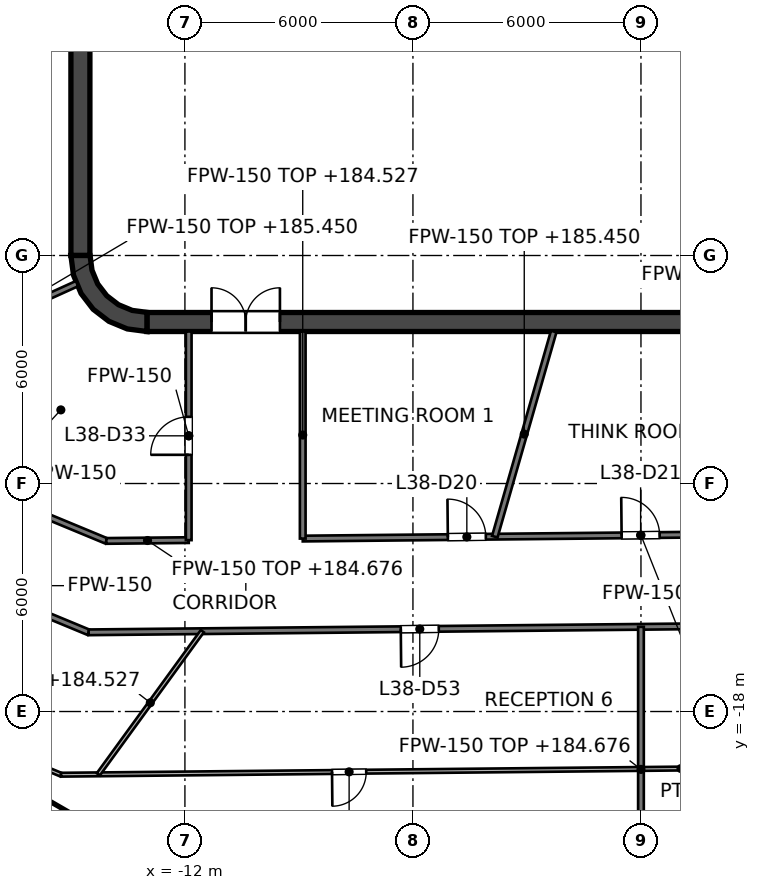
"""IFC4 building model, lengths in metres.
Left out: names, types, materials, properties, quantities, classifications, styles, units other than length and angle.
Written with IfcOpenShell. Run it as: python <this file> out.ifc"""

import sys

from ifc_helpers import new_model, si_unit, direction, frame, frame_2d, origin, place, context, subcontext, project, spatial, polyline, rectangle, outline, extrude, element, fill, save


model = new_model("IFC4")
c1 = context("Model", 3, precision=1e-05, world=origin(), true_north=direction((0.0, 1.0)))
c2 = subcontext(c1, "Body", "Model", "MODEL_VIEW")
j1 = project(units=[si_unit("LENGTHUNIT", "METRE"), si_unit("PLANEANGLEUNIT", "RADIAN")], contexts=[c1])
p1 = place(None, origin())
s1 = spatial("IfcSite", under=j1, at=p1, CompositionType="ELEMENT")
p2 = place(p1, origin())
s2 = spatial("IfcBuilding", under=s1, at=p2, CompositionType="ELEMENT")
p3 = place(p2, frame((0.0, 0.0, 181.6)))
s3 = spatial("IfcBuildingStorey", under=s2, at=p3, CompositionType="ELEMENT", Elevation=181.6)
p4 = place(p3, frame((-13.0, -7.75, 0.0), z_axis=(0.0, 0.0, 1.0), x_axis=(1.0, 0.0, 0.0)))
e1 = element("IfcWall", 1, at=p4, inside=s3, PredefinedType="SHEAR", context=c2, shape_type="SweptSolid", body=[
    extrude(rectangle(XDim=26.0, YDim=0.5, at=frame_2d((13.0, 0.0))), origin(), (0.0, 0.0, 1.0), 4.0),
])
p5 = place(p4, frame((1.7, 0.0, 0.0)))
e2 = element("IfcOpeningElement", 2, at=p5, cuts=e1, PredefinedType="OPENING", context=c2, shape_type="SweptSolid", body=[
    extrude(rectangle(XDim=1.8, YDim=2.1, at=frame_2d((0.9, 1.05))), frame((0.0, 0.25, 0.0), z_axis=(0.0, -1.0, 0.0), x_axis=(1.0, 0.0, 0.0)), (0.0, 0.0, 1.0), 0.5),
])
p6 = place(p4, frame((22.5, 0.0, 0.0)))
e3 = element("IfcOpeningElement", 3, at=p6, cuts=e1, PredefinedType="OPENING", context=c2, shape_type="SweptSolid", body=[
    extrude(rectangle(XDim=1.8, YDim=2.1, at=frame_2d((0.9, 1.05))), frame((0.0, 0.25, 0.0), z_axis=(0.0, -1.0, 0.0), x_axis=(1.0, 0.0, 0.0)), (0.0, 0.0, 1.0), 0.5),
])
p7 = place(p3, frame((-14.75, -6.0, 0.0), z_axis=(0.0, 0.0, 1.0), x_axis=(0.0, 1.0, 0.0)))
e4 = element("IfcWall", 4, at=p7, inside=s3, PredefinedType="SHEAR", context=c2, shape_type="SweptSolid", body=[
    extrude(rectangle(XDim=12.0, YDim=0.5, at=frame_2d((6.0, 0.0))), origin(), (0.0, 0.0, 1.0), 4.0),
])
p8 = place(p3, origin())
e5 = element("IfcWall", 5, at=p8, inside=s3, PredefinedType="SHEAR", context=c2, shape_type="SweptSolid", body=[
    extrude(outline(polyline([(-13.0, -8.0), (-13.0, -7.496), (-13.387, -7.445), (-13.748, -7.295), (-14.058, -7.058), (-14.295, -6.748), (-14.445, -6.387), (-14.496, -6.0), (-15.0, -6.0), (-14.932, -6.518), (-14.732, -7.0), (-14.414, -7.414), (-14.0, -7.732), (-13.518, -7.932), (-13.0, -8.0)])), origin(), (0.0, 0.0, 1.0), 4.0),
])
p9 = place(p3, frame((-9.0, -6.6, 0.0), z_axis=(0.0, 0.0, 1.0), x_axis=(0.0, 1.0, 0.0)))
e6 = element("IfcWall", 6, at=p9, inside=s3, PredefinedType="PARTITIONING", context=c2, shape_type="SweptSolid", body=[
    extrude(rectangle(XDim=2.5, YDim=0.25, at=frame_2d((1.25, 0.0))), origin(), (0.0, 0.0, 1.0), 3.85),
])
p10 = place(p9, frame((0.75, 0.0, 0.0)))
e7 = element("IfcOpeningElement", 7, at=p10, cuts=e6, PredefinedType="OPENING", context=c2, shape_type="SweptSolid", body=[
    extrude(rectangle(XDim=1.0, YDim=2.1, at=frame_2d((0.5, 1.05))), frame((0.0, 0.125, 0.0), z_axis=(0.0, -1.0, 0.0), x_axis=(1.0, 0.0, 0.0)), (0.0, 0.0, 1.0), 0.25),
])
p11 = place(p3, frame((-2.9, -6.6, 0.0), z_axis=(0.0, 0.0, 1.0), x_axis=(0.0, 1.0, 0.0)))
e8 = element("IfcWall", 8, at=p11, inside=s3, PredefinedType="PARTITIONING", context=c2, shape_type="SweptSolid", body=[
    extrude(rectangle(XDim=2.5, YDim=0.25, at=frame_2d((1.25, 0.0))), origin(), (0.0, 0.0, 1.0), 3.85),
])
p12 = place(p11, frame((0.8, 0.0, 0.0)))
e9 = element("IfcOpeningElement", 9, at=p12, cuts=e8, PredefinedType="OPENING", context=c2, shape_type="SweptSolid", body=[
    extrude(rectangle(XDim=0.9, YDim=2.1, at=frame_2d((0.45, 1.05))), frame((0.0, 0.125, 0.0), z_axis=(0.0, -1.0, 0.0), x_axis=(1.0, 0.0, 0.0)), (0.0, 0.0, 1.0), 0.25),
])
p13 = place(p3, frame((-9.125, -7.05, 0.0), z_axis=(0.0, 0.0, 1.0), x_axis=(1.0, 0.0, 0.0)))
e10 = element("IfcWall", 10, at=p13, inside=s3, PredefinedType="SOLIDWALL", context=c2, shape_type="SweptSolid", body=[
    extrude(rectangle(XDim=18.25, YDim=0.9, at=frame_2d((9.125, 0.0))), origin(), (0.0, 0.0, 1.0), 3.85),
])
p14 = place(p3, frame((-9.125, -1.525, 0.0), z_axis=(0.0, 0.0, 1.0), x_axis=(1.0, 0.0, 0.0)))
e11 = element("IfcWall", 11, at=p14, inside=s3, PredefinedType="SOLIDWALL", context=c2, shape_type="SweptSolid", body=[
    extrude(rectangle(XDim=18.25, YDim=0.25, at=frame_2d((9.125, 0.0))), origin(), (0.0, 0.0, 1.0), 3.85),
])
p15 = place(p14, frame((7.15, 0.0, 0.0)))
e12 = element("IfcOpeningElement", 12, at=p15, cuts=e11, PredefinedType="OPENING", context=c2, shape_type="SweptSolid", body=[
    extrude(rectangle(XDim=1.2, YDim=2.1, at=frame_2d((0.6, 1.05))), frame((0.0, 0.125, 0.0), z_axis=(0.0, -1.0, 0.0), x_axis=(1.0, 0.0, 0.0)), (0.0, 0.0, 1.0), 0.25),
])
p16 = place(p14, frame((10.2, 0.0, 0.0)))
e13 = element("IfcOpeningElement", 13, at=p16, cuts=e11, PredefinedType="OPENING", context=c2, shape_type="SweptSolid", body=[
    extrude(rectangle(XDim=1.2, YDim=2.1, at=frame_2d((0.6, 1.05))), frame((0.0, 0.125, 0.0), z_axis=(0.0, -1.0, 0.0), x_axis=(1.0, 0.0, 0.0)), (0.0, 0.0, 1.0), 0.25),
])
p17 = place(p14, frame((16.075, 0.0, 0.0)))
e14 = element("IfcOpeningElement", 14, at=p17, cuts=e11, PredefinedType="OPENING", context=c2, shape_type="SweptSolid", body=[
    extrude(rectangle(XDim=1.0, YDim=2.1, at=frame_2d((0.5, 1.05))), frame((0.0, 0.125, 0.0), z_axis=(0.0, -1.0, 0.0), x_axis=(1.0, 0.0, 0.0)), (0.0, 0.0, 1.0), 0.25),
])
p18 = place(p3, frame((-9.125, -3.975, 0.0), z_axis=(0.0, 0.0, 1.0), x_axis=(1.0, 0.0, 0.0)))
e15 = element("IfcWall", 15, at=p18, inside=s3, PredefinedType="SOLIDWALL", context=c2, shape_type="SweptSolid", body=[
    extrude(rectangle(XDim=12.4, YDim=0.25, at=frame_2d((6.2, 0.0))), origin(), (0.0, 0.0, 1.0), 3.85),
])
p19 = place(p18, frame((1.05, 0.0, 0.0)))
e16 = element("IfcOpeningElement", 16, at=p19, cuts=e15, PredefinedType="OPENING", context=c2, shape_type="SweptSolid", body=[
    extrude(rectangle(XDim=1.2, YDim=2.1, at=frame_2d((0.6, 1.05))), frame((0.0, 0.125, 0.0), z_axis=(0.0, -1.0, 0.0), x_axis=(1.0, 0.0, 0.0)), (0.0, 0.0, 1.0), 0.25),
])
p20 = place(p18, frame((4.1, 0.0, 0.0)))
e17 = element("IfcOpeningElement", 17, at=p20, cuts=e15, PredefinedType="OPENING", context=c2, shape_type="SweptSolid", body=[
    extrude(rectangle(XDim=1.2, YDim=2.1, at=frame_2d((0.6, 1.05))), frame((0.0, 0.125, 0.0), z_axis=(0.0, -1.0, 0.0), x_axis=(1.0, 0.0, 0.0)), (0.0, 0.0, 1.0), 0.25),
])
for number, where, z_axis, x_axis in (
    (18, (-9.0, -3.85, 0.0), (0.0, 0.0, 1.0), (0.0, 1.0, 0.0)),
    (19, (-5.95, -3.85, 0.0), (0.0, 0.0, 1.0), (0.0, 1.0, 0.0)),
    (20, (-2.9, -3.85, 0.0), (0.0, 0.0, 1.0), (0.0, 1.0, 0.0)),
    (21, (0.15, -3.85, 0.0), (0.0, 0.0, 1.0), (0.0, 1.0, 0.0)),
):
    element("IfcWall", number, at=place(p3, frame(where, z_axis=z_axis, x_axis=x_axis)), inside=s3, PredefinedType="SOLIDWALL", context=c2, shape_type="SweptSolid", body=[
        extrude(rectangle(XDim=2.2, YDim=0.25, at=frame_2d((1.1, 0.0))), origin(), (0.0, 0.0, 1.0), 3.85),
    ])
p21 = place(p3, frame((-11.8, -7.5, 0.0), z_axis=(0.0, 0.0, 1.0), x_axis=(0.0, 1.0, 0.0)))
e22 = element("IfcWall", 22, at=p21, inside=s3, PredefinedType="SOLIDWALL", context=c2, shape_type="SweptSolid", body=[
    extrude(rectangle(XDim=15.0, YDim=0.4, at=frame_2d((7.5, 0.0))), origin(), (0.0, 0.0, 1.0), 3.85),
])
p22 = place(p21, frame((11.3, 0.0, 0.0)))
e23 = element("IfcOpeningElement", 23, at=p22, cuts=e22, PredefinedType="OPENING", context=c2, shape_type="SweptSolid", body=[
    extrude(rectangle(XDim=1.1, YDim=2.1, at=frame_2d((0.55, 1.05))), frame((0.0, 0.2, 0.0), z_axis=(0.0, -1.0, 0.0), x_axis=(1.0, 0.0, 0.0)), (0.0, 0.0, 1.0), 0.4),
])
p23 = place(p21, frame((8.4, 0.0, 0.0)))
e24 = element("IfcOpeningElement", 24, at=p23, cuts=e22, PredefinedType="OPENING", context=c2, shape_type="SweptSolid", body=[
    extrude(rectangle(XDim=1.1, YDim=2.1, at=frame_2d((0.55, 1.05))), frame((0.0, 0.2, 0.0), z_axis=(0.0, -1.0, 0.0), x_axis=(1.0, 0.0, 0.0)), (0.0, 0.0, 1.0), 0.4),
])
p24 = place(p21, frame((5.5, 0.0, 0.0)))
e25 = element("IfcOpeningElement", 25, at=p24, cuts=e22, PredefinedType="OPENING", context=c2, shape_type="SweptSolid", body=[
    extrude(rectangle(XDim=1.1, YDim=2.1, at=frame_2d((0.55, 1.05))), frame((0.0, 0.2, 0.0), z_axis=(0.0, -1.0, 0.0), x_axis=(1.0, 0.0, 0.0)), (0.0, 0.0, 1.0), 0.4),
])
p25 = place(p21, frame((13.697, 0.0, 0.0)))
e26 = element("IfcOpeningElement", 26, at=p25, cuts=e22, PredefinedType="OPENING", context=c2, shape_type="SweptSolid", body=[
    extrude(rectangle(XDim=0.9, YDim=2.1, at=frame_2d((0.45, 1.05))), frame((0.0, 0.2, 0.0), z_axis=(0.0, -1.0, 0.0), x_axis=(1.0, 0.0, 0.0)), (0.0, 0.0, 1.0), 0.4),
])
p26 = place(p21, frame((0.403, 0.0, 0.0)))
e27 = element("IfcOpeningElement", 27, at=p26, cuts=e22, PredefinedType="OPENING", context=c2, shape_type="SweptSolid", body=[
    extrude(rectangle(XDim=0.9, YDim=2.1, at=frame_2d((0.45, 1.05))), frame((0.0, 0.2, 0.0), z_axis=(0.0, -1.0, 0.0), x_axis=(1.0, 0.0, 0.0)), (0.0, 0.0, 1.0), 0.4),
])
e28 = element("IfcWall", 28, at=p8, inside=s3, PredefinedType="SOLIDWALL", context=c2, shape_type="SweptSolid", body=[
    extrude(outline(polyline([(-12.0, -5.925), (-12.0, -5.675), (-14.25, -5.675), (-14.25, -3.025), (-12.0, -3.025), (-12.0, -2.775), (-14.25, -2.775), (-14.25, -0.125), (-12.0, -0.125), (-12.0, 0.125), (-14.25, 0.125), (-14.25, 2.775), (-12.0, 2.775), (-12.0, 3.025), (-14.25, 3.025), (-14.25, 5.675), (-12.0, 5.675), (-12.0, 5.925), (-14.25, 5.925), (-14.5, 5.925), (-14.5, 5.675), (-14.5, 3.025), (-14.5, 2.775), (-14.5, 0.125), (-14.5, -0.125), (-14.5, -2.775), (-14.5, -3.025), (-14.5, -5.675), (-14.5, -5.925), (-14.25, -5.925), (-12.0, -5.925)])), origin(), (0.0, 0.0, 1.0), 3.85),
])
p27 = place(p3, frame((-20.46, -13.46, 0.0), z_axis=(0.0, 0.0, 1.0), x_axis=(0.923801547606, -0.382871650349, 0.0)))
e29 = element("IfcWall", 29, at=p27, inside=s3, PredefinedType="PARTITIONING", context=c2, shape_type="SweptSolid", body=[
    extrude(rectangle(XDim=6.415, YDim=0.15, at=frame_2d((3.208, 0.0))), origin(), (0.0, 0.0, 1.0), 2.995),
])
p28 = place(p27, frame((2.707, 0.0, 0.0)))
e30 = element("IfcOpeningElement", 30, at=p28, cuts=e29, PredefinedType="OPENING", context=c2, shape_type="SweptSolid", body=[
    extrude(rectangle(XDim=1.0, YDim=2.1, at=frame_2d((0.5, 1.05))), frame((0.0, 0.075, 0.0), z_axis=(0.0, -1.0, 0.0), x_axis=(1.0, 0.0, 0.0)), (0.0, 0.0, 1.0), 0.15),
])
p29 = place(p3, frame((-18.623, -11.623, 0.0), z_axis=(0.0, 0.0, 1.0), x_axis=(0.923791670587, -0.38289548098, 0.0)))
e31 = element("IfcWall", 31, at=p29, inside=s3, PredefinedType="PARTITIONING", context=c2, shape_type="SweptSolid", body=[
    extrude(rectangle(XDim=4.931, YDim=0.15, at=frame_2d((2.465, 0.0))), origin(), (0.0, 0.0, 1.0), 2.995),
])
p30 = place(p3, frame((-14.534, -15.916, 0.0), z_axis=(0.0, 0.0, 1.0), x_axis=(0.999950564508, 0.009943266119, 0.0)))
e32 = element("IfcWall", 32, at=p30, inside=s3, PredefinedType="PARTITIONING", context=c2, shape_type="SweptSolid", body=[
    extrude(rectangle(XDim=33.123, YDim=0.15, at=frame_2d((16.561, 0.0))), origin(), (0.0, 0.0, 1.0), 2.927),
])
p31 = place(p30, frame((20.091, 0.0, 0.0)))
e33 = element("IfcOpeningElement", 33, at=p31, cuts=e32, PredefinedType="OPENING", context=c2, shape_type="SweptSolid", body=[
    extrude(rectangle(XDim=1.0, YDim=2.1, at=frame_2d((0.5, 1.05))), frame((0.0, 0.075, 0.0), z_axis=(0.0, -1.0, 0.0), x_axis=(1.0, 0.0, 0.0)), (0.0, 0.0, 1.0), 0.15),
])
p32 = place(p30, frame((27.906, 0.0, 0.0)))
e34 = element("IfcOpeningElement", 34, at=p32, cuts=e32, PredefinedType="OPENING", context=c2, shape_type="SweptSolid", body=[
    extrude(rectangle(XDim=1.0, YDim=2.1, at=frame_2d((0.5, 1.05))), frame((0.0, 0.075, 0.0), z_axis=(0.0, -1.0, 0.0), x_axis=(1.0, 0.0, 0.0)), (0.0, 0.0, 1.0), 0.15),
])
p33 = place(p30, frame((8.214, 0.0, 0.0)))
e35 = element("IfcOpeningElement", 35, at=p33, cuts=e32, PredefinedType="OPENING", context=c2, shape_type="SweptSolid", body=[
    extrude(rectangle(XDim=1.0, YDim=2.1, at=frame_2d((0.5, 1.05))), frame((0.0, 0.075, 0.0), z_axis=(0.0, -1.0, 0.0), x_axis=(1.0, 0.0, 0.0)), (0.0, 0.0, 1.0), 0.15),
])
p34 = place(p3, frame((-14.068, -13.511, 0.0), z_axis=(0.0, 0.0, 1.0), x_axis=(0.999950911515, 0.009908307647, 0.0)))
e36 = element("IfcWall", 36, at=p34, inside=s3, PredefinedType="PARTITIONING", context=c2, shape_type="SweptSolid", body=[
    extrude(rectangle(XDim=2.168, YDim=0.15, at=frame_2d((1.084, 0.0))), origin(), (0.0, 0.0, 1.0), 3.076),
])
p35 = place(p3, frame((-8.9, -13.449, 0.0), z_axis=(0.0, 0.0, 1.0), x_axis=(0.99995056171, 0.009943547447, 0.0)))
e37 = element("IfcWall", 37, at=p35, inside=s3, PredefinedType="PARTITIONING", context=c2, shape_type="SweptSolid", body=[
    extrude(rectangle(XDim=17.801, YDim=0.15, at=frame_2d((8.9, 0.0))), origin(), (0.0, 0.0, 1.0), 2.927),
])
p36 = place(p35, frame((3.818, 0.0, 0.0)))
e38 = element("IfcOpeningElement", 38, at=p36, cuts=e37, PredefinedType="OPENING", context=c2, shape_type="SweptSolid", body=[
    extrude(rectangle(XDim=1.0, YDim=2.1, at=frame_2d((0.5, 1.05))), frame((0.0, 0.075, 0.0), z_axis=(0.0, -1.0, 0.0), x_axis=(1.0, 0.0, 0.0)), (0.0, 0.0, 1.0), 0.15),
])
p37 = place(p35, frame((8.391, 0.0, 0.0)))
e39 = element("IfcOpeningElement", 39, at=p37, cuts=e37, PredefinedType="OPENING", context=c2, shape_type="SweptSolid", body=[
    extrude(rectangle(XDim=1.0, YDim=2.1, at=frame_2d((0.5, 1.05))), frame((0.0, 0.075, 0.0), z_axis=(0.0, -1.0, 0.0), x_axis=(1.0, 0.0, 0.0)), (0.0, 0.0, 1.0), 0.15),
])
p38 = place(p35, frame((12.975, 0.0, 0.0)))
e40 = element("IfcOpeningElement", 40, at=p38, cuts=e37, PredefinedType="OPENING", context=c2, shape_type="SweptSolid", body=[
    extrude(rectangle(XDim=1.0, YDim=2.1, at=frame_2d((0.5, 1.05))), frame((0.0, 0.075, 0.0), z_axis=(0.0, -1.0, 0.0), x_axis=(1.0, 0.0, 0.0)), (0.0, 0.0, 1.0), 0.15),
])
p39 = place(p3, frame((-19.728, -8.958, 0.0), z_axis=(0.0, 0.0, 1.0), x_axis=(0.910629511797, 0.413223779863, 0.0)))
e41 = element("IfcWall", 41, at=p39, inside=s3, PredefinedType="PARTITIONING", context=c2, shape_type="SweptSolid", body=[
    extrude(rectangle(XDim=5.368, YDim=0.15, at=frame_2d((2.684, 0.0))), origin(), (0.0, 0.0, 1.0), 3.85),
])
p40 = place(p3, frame((-3.846, -13.399, 0.0), z_axis=(0.0, 0.0, 1.0), x_axis=(0.275914969745, 0.961182048038, 0.0)))
e42 = element("IfcWall", 42, at=p40, inside=s3, PredefinedType="PARTITIONING", context=c2, shape_type="SweptSolid", body=[
    extrude(rectangle(XDim=5.617, YDim=0.15, at=frame_2d((2.809, 0.0))), origin(), (0.0, 0.0, 1.0), 3.85),
])
p41 = place(p3, frame((0.0, -23.274, 0.0), z_axis=(0.0, 0.0, 1.0), x_axis=(0.0, 1.0, 0.0)))
e43 = element("IfcWall", 43, at=p41, inside=s3, PredefinedType="PARTITIONING", context=c2, shape_type="SweptSolid", body=[
    extrude(rectangle(XDim=7.502, YDim=0.15, at=frame_2d((3.751, 0.0))), origin(), (0.0, 0.0, 1.0), 3.076),
])
p42 = place(p3, frame((-8.9, -13.449, 0.0), z_axis=(0.0, 0.0, 1.0), x_axis=(0.0, 1.0, 0.0)))
e44 = element("IfcWall", 44, at=p42, inside=s3, PredefinedType="PARTITIONING", context=c2, shape_type="SweptSolid", body=[
    extrude(rectangle(XDim=5.449, YDim=0.15, at=frame_2d((2.725, 0.0))), origin(), (0.0, 0.0, 1.0), 2.927),
])
p43 = place(p3, frame((-11.9, -13.49, 0.0), z_axis=(0.0, 0.0, 1.0), x_axis=(0.0, 1.0, 0.0)))
e45 = element("IfcWall", 45, at=p43, inside=s3, PredefinedType="PARTITIONING", context=c2, shape_type="SweptSolid", body=[
    extrude(rectangle(XDim=5.49, YDim=0.15, at=frame_2d((2.745, 0.0))), origin(), (0.0, 0.0, 1.0), 2.995),
])
p44 = place(p43, frame((2.245, 0.0, 0.0)))
e46 = element("IfcOpeningElement", 46, at=p44, cuts=e45, PredefinedType="OPENING", context=c2, shape_type="SweptSolid", body=[
    extrude(rectangle(XDim=1.0, YDim=2.1, at=frame_2d((0.5, 1.05))), frame((0.0, 0.075, 0.0), z_axis=(0.0, -1.0, 0.0), x_axis=(1.0, 0.0, 0.0)), (0.0, 0.0, 1.0), 0.15),
])
p45 = place(p3, frame((-20.732, -17.395, 0.0), z_axis=(0.0, 0.0, 1.0), x_axis=(0.923788700377, -0.382902646968, 0.0)))
e47 = element("IfcWall", 47, at=p45, inside=s3, PredefinedType="PARTITIONING", context=c2, shape_type="SweptSolid", body=[
    extrude(rectangle(XDim=5.923, YDim=0.1, at=frame_2d((2.962, 0.0))), origin(), (0.0, 0.0, 1.0), 3.373),
])
p46 = place(p3, frame((-15.26, -19.663, 0.0), z_axis=(0.0, 0.0, 1.0), x_axis=(0.999950698652, 0.009929766651, 0.0)))
e48 = element("IfcWall", 48, at=p46, inside=s3, PredefinedType="PARTITIONING", context=c2, shape_type="SweptSolid", body=[
    extrude(rectangle(XDim=32.627, YDim=0.1, at=frame_2d((16.313, 0.0))), origin(), (0.0, 0.0, 1.0), 2.927),
])
p47 = place(p46, frame((27.063, 0.0, 0.0)))
e49 = element("IfcOpeningElement", 49, at=p47, cuts=e48, PredefinedType="OPENING", context=c2, shape_type="SweptSolid", body=[
    extrude(rectangle(XDim=0.9, YDim=2.1, at=frame_2d((0.45, 1.05))), frame((0.0, 0.05, 0.0), z_axis=(0.0, -1.0, 0.0), x_axis=(1.0, 0.0, 0.0)), (0.0, 0.0, 1.0), 0.1),
])
p48 = place(p46, frame((7.131, 0.0, 0.0)))
e50 = element("IfcOpeningElement", 50, at=p48, cuts=e48, PredefinedType="OPENING", context=c2, shape_type="SweptSolid", body=[
    extrude(rectangle(XDim=0.9, YDim=2.1, at=frame_2d((0.45, 1.05))), frame((0.0, 0.05, 0.0), z_axis=(0.0, -1.0, 0.0), x_axis=(1.0, 0.0, 0.0)), (0.0, 0.0, 1.0), 0.1),
])
p49 = place(p3, frame((-14.279, -19.653, 0.0), z_axis=(0.0, 0.0, 1.0), x_axis=(0.587800653116, 0.809005804797, 0.0)))
e51 = element("IfcWall", 51, at=p49, inside=s3, PredefinedType="PARTITIONING", context=c2, shape_type="SweptSolid", body=[
    extrude(rectangle(XDim=4.656, YDim=0.1, at=frame_2d((2.328, 0.0))), origin(), (0.0, 0.0, 1.0), 2.927),
])
p50 = place(p24, origin())
e52 = element("IfcDoor", 52, at=p50, inside=s3, OperationType="DOUBLE_DOOR_SLIDING", PredefinedType="DOOR", context=c2, shape_type="SweptSolid", body=[
    extrude(rectangle(XDim=1.1, YDim=2.1, at=frame_2d((0.55, 1.05))), frame((0.0, 0.025, 0.0), z_axis=(0.0, -1.0, 0.0), x_axis=(1.0, 0.0, 0.0)), (0.0, 0.0, 1.0), 0.05),
])
fill(e25, e52)
p51 = place(p19, origin())
e53 = element("IfcDoor", 53, at=p51, inside=s3, OperationType="DOUBLE_DOOR_SLIDING", PredefinedType="DOOR", context=c2, shape_type="SweptSolid", body=[
    extrude(rectangle(XDim=1.2, YDim=2.1, at=frame_2d((0.6, 1.05))), frame((0.0, 0.025, 0.0), z_axis=(0.0, -1.0, 0.0), x_axis=(1.0, 0.0, 0.0)), (0.0, 0.0, 1.0), 0.05),
])
fill(e16, e53)
p52 = place(p20, origin())
e54 = element("IfcDoor", 54, at=p52, inside=s3, OperationType="DOUBLE_DOOR_SLIDING", PredefinedType="DOOR", context=c2, shape_type="SweptSolid", body=[
    extrude(rectangle(XDim=1.2, YDim=2.1, at=frame_2d((0.6, 1.05))), frame((0.0, 0.025, 0.0), z_axis=(0.0, -1.0, 0.0), x_axis=(1.0, 0.0, 0.0)), (0.0, 0.0, 1.0), 0.05),
])
fill(e17, e54)
p53 = place(p15, origin())
e55 = element("IfcDoor", 55, at=p53, inside=s3, OperationType="DOUBLE_DOOR_SLIDING", PredefinedType="DOOR", context=c2, shape_type="SweptSolid", body=[
    extrude(rectangle(XDim=1.2, YDim=2.1, at=frame_2d((0.6, 1.05))), frame((0.0, 0.025, 0.0), z_axis=(0.0, -1.0, 0.0), x_axis=(1.0, 0.0, 0.0)), (0.0, 0.0, 1.0), 0.05),
])
fill(e12, e55)
p54 = place(p10, origin())
e56 = element("IfcDoor", 56, at=p54, inside=s3, OperationType="SINGLE_SWING_LEFT", PredefinedType="DOOR", context=c2, shape_type="SweptSolid", body=[
    extrude(rectangle(XDim=1.0, YDim=2.1, at=frame_2d((0.5, 1.05))), frame((0.0, 0.025, 0.0), z_axis=(0.0, -1.0, 0.0), x_axis=(1.0, 0.0, 0.0)), (0.0, 0.0, 1.0), 0.05),
])
fill(e7, e56)
p55 = place(p12, origin())
e57 = element("IfcDoor", 57, at=p55, inside=s3, OperationType="SINGLE_SWING_RIGHT", PredefinedType="DOOR", context=c2, shape_type="SweptSolid", body=[
    extrude(rectangle(XDim=0.9, YDim=2.1, at=frame_2d((0.45, 1.05))), frame((0.0, 0.025, 0.0), z_axis=(0.0, -1.0, 0.0), x_axis=(1.0, 0.0, 0.0)), (0.0, 0.0, 1.0), 0.05),
])
fill(e9, e57)
p56 = place(p26, origin())
e58 = element("IfcDoor", 58, at=p56, inside=s3, OperationType="SINGLE_SWING_LEFT", PredefinedType="DOOR", context=c2, shape_type="SweptSolid", body=[
    extrude(rectangle(XDim=0.9, YDim=2.1, at=frame_2d((0.45, 1.05))), frame((0.0, 0.025, 0.0), z_axis=(0.0, -1.0, 0.0), x_axis=(1.0, 0.0, 0.0)), (0.0, 0.0, 1.0), 0.05),
])
fill(e27, e58)
p57 = place(p5, origin())
e59 = element("IfcDoor", 59, at=p57, inside=s3, OperationType="DOUBLE_DOOR_SINGLE_SWING", PredefinedType="DOOR", context=c2, shape_type="SweptSolid", body=[
    extrude(rectangle(XDim=1.8, YDim=2.1, at=frame_2d((0.9, 1.05))), frame((0.0, 0.025, 0.0), z_axis=(0.0, -1.0, 0.0), x_axis=(1.0, 0.0, 0.0)), (0.0, 0.0, 1.0), 0.05),
])
fill(e2, e59)
p58 = place(p36, origin())
e60 = element("IfcDoor", 60, at=p58, inside=s3, OperationType="SINGLE_SWING_LEFT", PredefinedType="DOOR", context=c2, shape_type="SweptSolid", body=[
    extrude(rectangle(XDim=1.0, YDim=2.1, at=frame_2d((0.5, 1.05))), frame((0.0, 0.025, 0.0), z_axis=(0.0, -1.0, 0.0), x_axis=(1.0, 0.0, 0.0)), (0.0, 0.0, 1.0), 0.05),
])
fill(e38, e60)
p59 = place(p37, origin())
e61 = element("IfcDoor", 61, at=p59, inside=s3, OperationType="SINGLE_SWING_LEFT", PredefinedType="DOOR", context=c2, shape_type="SweptSolid", body=[
    extrude(rectangle(XDim=1.0, YDim=2.1, at=frame_2d((0.5, 1.05))), frame((0.0, 0.025, 0.0), z_axis=(0.0, -1.0, 0.0), x_axis=(1.0, 0.0, 0.0)), (0.0, 0.0, 1.0), 0.05),
])
fill(e39, e61)
p60 = place(p44, origin())
e62 = element("IfcDoor", 62, at=p60, inside=s3, OperationType="SINGLE_SWING_LEFT", PredefinedType="DOOR", context=c2, shape_type="SweptSolid", body=[
    extrude(rectangle(XDim=1.0, YDim=2.1, at=frame_2d((0.5, 1.05))), frame((0.0, 0.025, 0.0), z_axis=(0.0, -1.0, 0.0), x_axis=(1.0, 0.0, 0.0)), (0.0, 0.0, 1.0), 0.05),
])
fill(e46, e62)
p61 = place(p33, origin())
e63 = element("IfcDoor", 63, at=p61, inside=s3, OperationType="SINGLE_SWING_LEFT", PredefinedType="DOOR", context=c2, shape_type="SweptSolid", body=[
    extrude(rectangle(XDim=1.0, YDim=2.1, at=frame_2d((0.5, 1.05))), frame((0.0, 0.025, 0.0), z_axis=(0.0, -1.0, 0.0), x_axis=(1.0, 0.0, 0.0)), (0.0, 0.0, 1.0), 0.05),
])
fill(e35, e63)
p62 = place(p48, origin())
e64 = element("IfcDoor", 64, at=p62, inside=s3, OperationType="SINGLE_SWING_LEFT", PredefinedType="DOOR", context=c2, shape_type="SweptSolid", body=[
    extrude(rectangle(XDim=0.9, YDim=2.1, at=frame_2d((0.45, 1.05))), frame((0.0, 0.025, 0.0), z_axis=(0.0, -1.0, 0.0), x_axis=(1.0, 0.0, 0.0)), (0.0, 0.0, 1.0), 0.05),
])
fill(e50, e64)
save(model, sys.argv[1])
